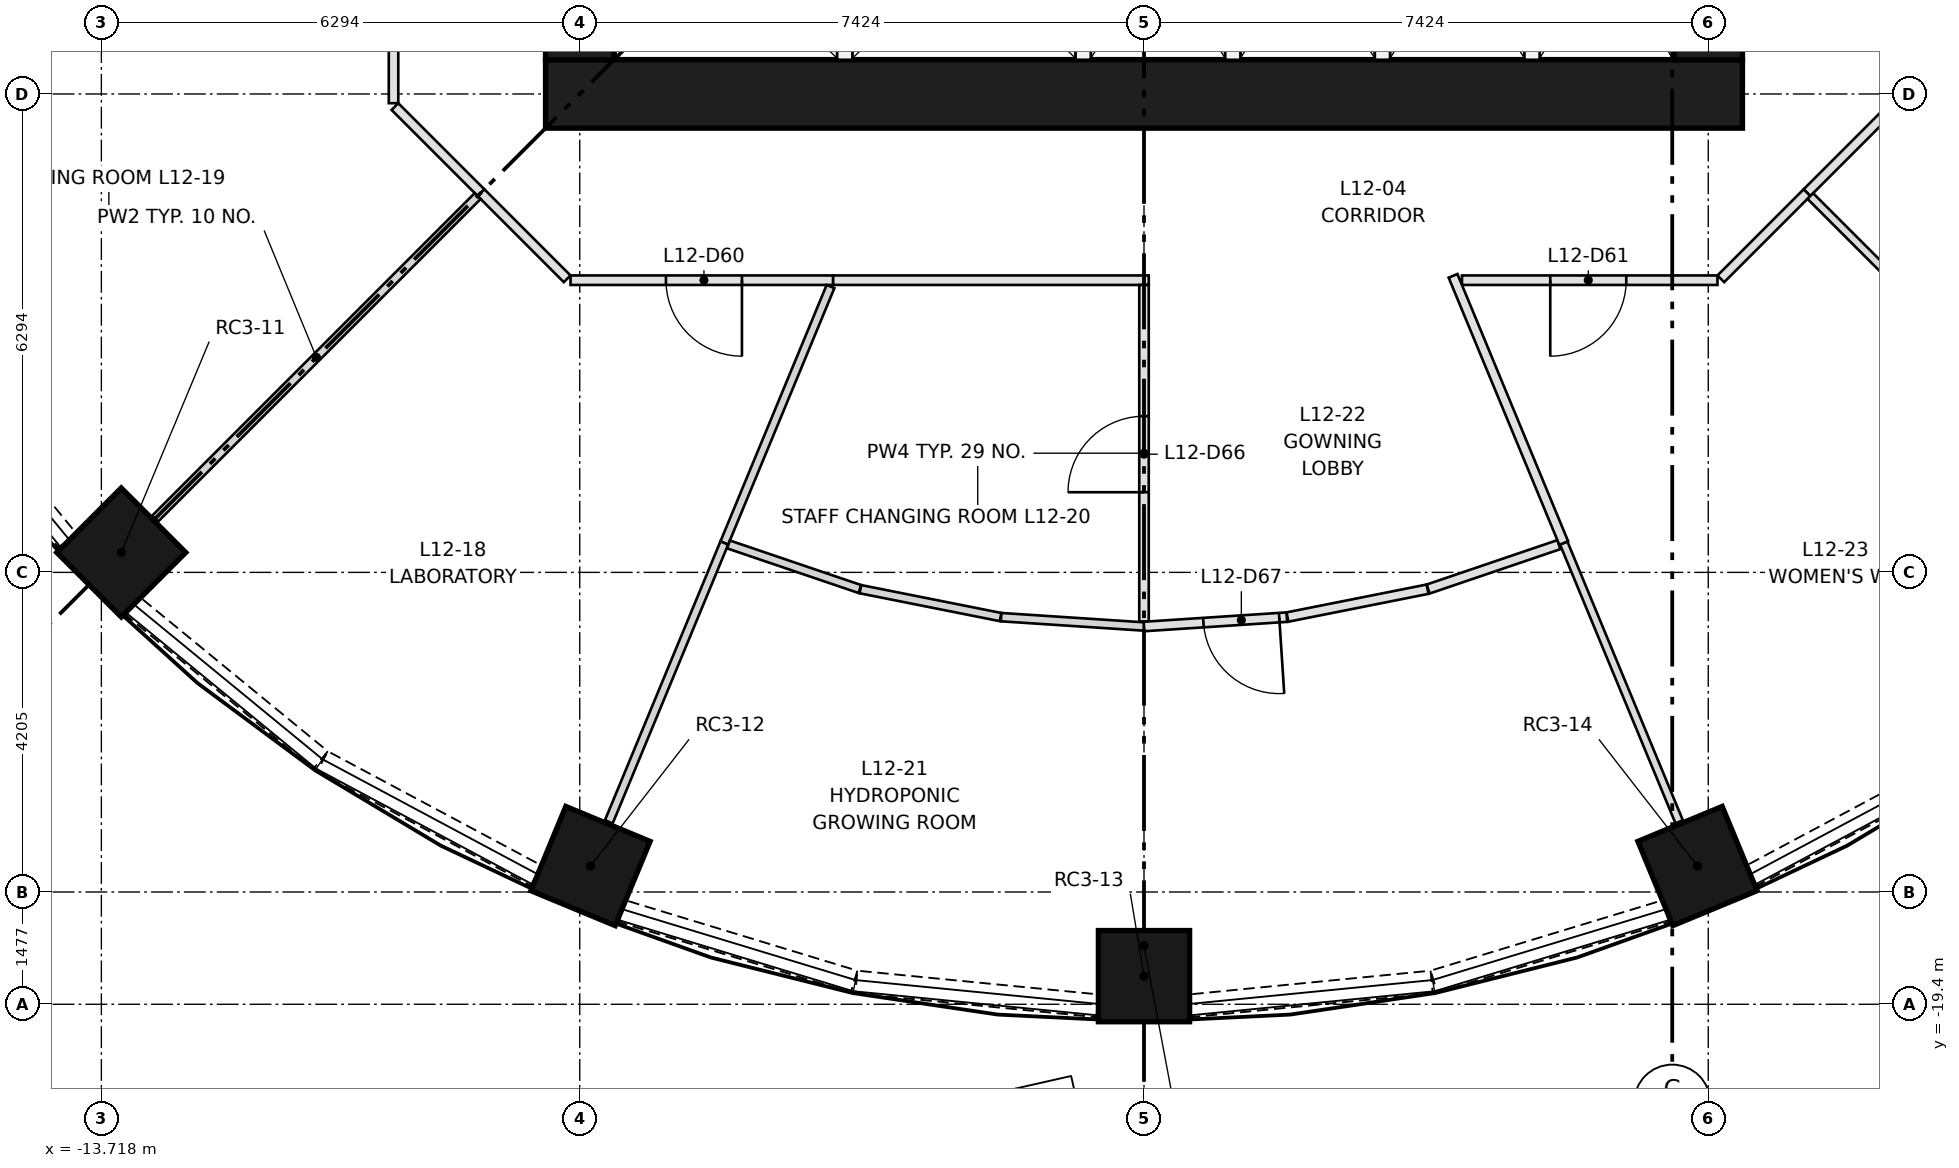
"""IFC4 building model, lengths in metres.
Left out: names, types, materials, properties, quantities, classifications, styles, units other than length and angle.
Written with IfcOpenShell. Run it as: python <this file> out.ifc"""

import sys

from ifc_helpers import new_model, si_unit, direction, frame, frame_2d, origin, origin_2d, place, context, subcontext, project, spatial, rectangle, extrude, element, fill, save


model = new_model("IFC4")
c1 = context("Model", 3, precision=1e-05, world=origin(), true_north=direction((0.0, 1.0)))
c2 = subcontext(c1, "Body", "Model", "MODEL_VIEW")
j1 = project(units=[si_unit("LENGTHUNIT", "METRE"), si_unit("PLANEANGLEUNIT", "RADIAN")], contexts=[c1])
p1 = place(None, origin())
s1 = spatial("IfcSite", under=j1, at=p1, CompositionType="ELEMENT")
p2 = place(p1, origin())
s2 = spatial("IfcBuilding", under=s1, at=p2, CompositionType="ELEMENT")
p3 = place(p2, frame((0.0, 0.0, 48.1)))
s3 = spatial("IfcBuildingStorey", under=s2, at=p3, CompositionType="ELEMENT", Elevation=48.1)
for number, where, z_axis, x_axis in (
    (1, (-13.456, -13.456, 0.0), (0.0, 0.0, 1.0), (-0.707, -0.707, 0.0)),
    (2, (-7.282, -17.582, 0.0), (0.0, 0.0, 1.0), (-0.383, -0.924, 0.0)),
    (3, (0.0, -19.03, 0.0), (0.0, 0.0, 1.0), (0.0, -1.0, 0.0)),
    (4, (7.282, -17.582, 0.0), (0.0, 0.0, 1.0), (0.383, -0.924, 0.0)),
):
    element("IfcColumn", number, at=place(p3, frame(where, z_axis=z_axis, x_axis=x_axis)), inside=s3, PredefinedType="COLUMN", context=c2, shape_type="SweptSolid", body=[
        extrude(rectangle(XDim=1.2, YDim=1.2, at=origin_2d()), origin(), (0.0, 0.0, 1.0), 3.65),
    ])
p4 = place(p3, frame((-7.874, -7.424, 0.0), z_axis=(0.0, 0.0, 1.0), x_axis=(1.0, 0.0, 0.0)))
e5 = element("IfcWall", 5, at=p4, inside=s3, PredefinedType="SHEAR", context=c2, shape_type="SweptSolid", body=[
    extrude(rectangle(XDim=15.748, YDim=0.9, at=frame_2d((7.874, 0.0))), origin(), (0.0, 0.0, 1.0), 3.65),
])
p5 = place(p3, frame((-7.424, -6.974, 0.0), z_axis=(0.0, 0.0, 1.0), x_axis=(0.0, 1.0, 0.0)))
e6 = element("IfcWall", 6, at=p5, inside=s3, PredefinedType="SHEAR", context=c2, shape_type="SweptSolid", body=[
    extrude(rectangle(XDim=13.948, YDim=0.9, at=frame_2d((6.974, 0.0))), origin(), (0.0, 0.0, 1.0), 3.65),
])
p6 = place(p5, frame((6.474, 0.0, 0.0)))
e7 = element("IfcOpeningElement", 7, at=p6, cuts=e6, PredefinedType="OPENING", context=c2, shape_type="SweptSolid", body=[
    extrude(rectangle(XDim=1.0, YDim=2.1, at=frame_2d((0.5, 1.05))), frame((0.0, 0.46, 0.0), z_axis=(0.0, -1.0, 0.0), x_axis=(1.0, 0.0, 0.0)), (0.0, 0.0, 1.0), 0.92),
])
p7 = place(p5, frame((3.35, 0.0, 0.0)))
e8 = element("IfcOpeningElement", 8, at=p7, cuts=e6, PredefinedType="OPENING", context=c2, shape_type="SweptSolid", body=[
    extrude(rectangle(XDim=1.8, YDim=2.1, at=frame_2d((0.9, 1.05))), frame((0.0, 0.46, 0.0), z_axis=(0.0, -1.0, 0.0), x_axis=(1.0, 0.0, 0.0)), (0.0, 0.0, 1.0), 0.92),
])
p8 = place(p5, frame((8.799, 0.0, 0.0)))
e9 = element("IfcOpeningElement", 9, at=p8, cuts=e6, PredefinedType="OPENING", context=c2, shape_type="SweptSolid", body=[
    extrude(rectangle(XDim=1.8, YDim=2.1, at=frame_2d((0.9, 1.05))), frame((0.0, 0.46, 0.0), z_axis=(0.0, -1.0, 0.0), x_axis=(1.0, 0.0, 0.0)), (0.0, 0.0, 1.0), 0.92),
])
p9 = place(p5, frame((11.974, 0.0, 0.0)))
e10 = element("IfcOpeningElement", 10, at=p9, cuts=e6, PredefinedType="OPENING", context=c2, shape_type="SweptSolid", body=[
    extrude(rectangle(XDim=1.0, YDim=2.1, at=frame_2d((0.5, 1.05))), frame((0.0, 0.46, 0.0), z_axis=(0.0, -1.0, 0.0), x_axis=(1.0, 0.0, 0.0)), (0.0, 0.0, 1.0), 0.92),
])
p10 = place(p3, frame((7.424, -6.974, 0.0), z_axis=(0.0, 0.0, 1.0), x_axis=(0.0, 1.0, 0.0)))
e11 = element("IfcWall", 11, at=p10, inside=s3, PredefinedType="SHEAR", context=c2, shape_type="SweptSolid", body=[
    extrude(rectangle(XDim=13.948, YDim=0.9, at=frame_2d((6.974, 0.0))), origin(), (0.0, 0.0, 1.0), 3.65),
])
p11 = place(p10, frame((6.474, 0.0, 0.0)))
e12 = element("IfcOpeningElement", 12, at=p11, cuts=e11, PredefinedType="OPENING", context=c2, shape_type="SweptSolid", body=[
    extrude(rectangle(XDim=1.0, YDim=2.1, at=frame_2d((0.5, 1.05))), frame((0.0, 0.46, 0.0), z_axis=(0.0, -1.0, 0.0), x_axis=(1.0, 0.0, 0.0)), (0.0, 0.0, 1.0), 0.92),
])
p12 = place(p10, frame((3.35, 0.0, 0.0)))
e13 = element("IfcOpeningElement", 13, at=p12, cuts=e11, PredefinedType="OPENING", context=c2, shape_type="SweptSolid", body=[
    extrude(rectangle(XDim=1.8, YDim=2.1, at=frame_2d((0.9, 1.05))), frame((0.0, 0.46, 0.0), z_axis=(0.0, -1.0, 0.0), x_axis=(1.0, 0.0, 0.0)), (0.0, 0.0, 1.0), 0.92),
])
p13 = place(p10, frame((8.799, 0.0, 0.0)))
e14 = element("IfcOpeningElement", 14, at=p13, cuts=e11, PredefinedType="OPENING", context=c2, shape_type="SweptSolid", body=[
    extrude(rectangle(XDim=1.8, YDim=2.1, at=frame_2d((0.9, 1.05))), frame((0.0, 0.46, 0.0), z_axis=(0.0, -1.0, 0.0), x_axis=(1.0, 0.0, 0.0)), (0.0, 0.0, 1.0), 0.92),
])
for number, where, z_axis, x_axis in (
    (15, (-3.937, -6.974, 0.0), (0.0, 0.0, 1.0), (0.0, 1.0, 0.0)),
    (16, (-0.8, -6.974, 0.0), (0.0, 0.0, 1.0), (0.0, 1.0, 0.0)),
    (17, (1.168, -6.974, 0.0), (0.0, 0.0, 1.0), (0.0, 1.0, 0.0)),
    (18, (3.137, -6.974, 0.0), (0.0, 0.0, 1.0), (0.0, 1.0, 0.0)),
    (19, (5.105, -6.974, 0.0), (0.0, 0.0, 1.0), (0.0, 1.0, 0.0)),
):
    element("IfcWall", number, at=place(p3, frame(where, z_axis=z_axis, x_axis=x_axis)), inside=s3, PredefinedType="PARTITIONING", context=c2, shape_type="SweptSolid", body=[
        extrude(rectangle(XDim=2.8, YDim=0.2, at=frame_2d((1.4, 0.0))), origin(), (0.0, 0.0, 1.0), 3.3),
    ])
for number, where, z_axis, x_axis in (
    (20, (-16.188, -10.833, 0.0), (0.0, 0.0, 1.0), (0.634, -0.773, 0.0)),
    (21, (-13.298, -14.166, 0.0), (0.0, 0.0, 1.0), (0.773, -0.634, 0.0)),
):
    element("IfcWall", number, at=place(p3, frame(where, z_axis=z_axis, x_axis=x_axis)), inside=s3, PredefinedType="SOLIDWALL", context=c2, shape_type="SweptSolid", body=[
        extrude(rectangle(XDim=3.188, YDim=0.3, at=frame_2d((1.594, 0.0))), origin(), (0.0, 0.0, 1.0), 0.9),
    ])
p14 = place(p3, frame((-10.809, -16.204, 0.0), z_axis=(0.0, 0.0, 1.0), x_axis=(0.881994263934, -0.471260138764, 0.0)))
e22 = element("IfcWall", 22, at=p14, inside=s3, PredefinedType="SOLIDWALL", context=c2, shape_type="SweptSolid", body=[
    extrude(rectangle(XDim=3.187, YDim=0.3, at=frame_2d((1.593, 0.0))), origin(), (0.0, 0.0, 1.0), 0.9),
])
p15 = place(p3, frame((-6.865, -18.175, 0.0), z_axis=(0.0, 0.0, 1.0), x_axis=(0.956849017819, -0.290585541792, 0.0)))
e23 = element("IfcWall", 23, at=p15, inside=s3, PredefinedType="SOLIDWALL", context=c2, shape_type="SweptSolid", body=[
    extrude(rectangle(XDim=3.188, YDim=0.3, at=frame_2d((1.594, 0.0))), origin(), (0.0, 0.0, 1.0), 0.9),
])
for number, where, z_axis, x_axis in (
    (24, (-3.785, -19.107, 0.0), (0.0, 0.0, 1.0), (0.995, -0.098, 0.0)),
    (25, (0.613, -19.419, 0.0), (0.0, 0.0, 1.0), (0.995, 0.098, 0.0)),
):
    element("IfcWall", number, at=place(p3, frame(where, z_axis=z_axis, x_axis=x_axis)), inside=s3, PredefinedType="SOLIDWALL", context=c2, shape_type="SweptSolid", body=[
        extrude(rectangle(XDim=3.188, YDim=0.3, at=frame_2d((1.594, 0.0))), origin(), (0.0, 0.0, 1.0), 0.9),
    ])
p16 = place(p3, frame((3.814, -19.102, 0.0), z_axis=(0.0, 0.0, 1.0), x_axis=(0.956849017819, 0.290585541792, 0.0)))
e26 = element("IfcWall", 26, at=p16, inside=s3, PredefinedType="SOLIDWALL", context=c2, shape_type="SweptSolid", body=[
    extrude(rectangle(XDim=3.188, YDim=0.3, at=frame_2d((1.594, 0.0))), origin(), (0.0, 0.0, 1.0), 0.9),
])
p17 = place(p3, frame((7.998, -17.706, 0.0), z_axis=(0.0, 0.0, 1.0), x_axis=(0.881994263934, 0.471260138764, 0.0)))
e27 = element("IfcWall", 27, at=p17, inside=s3, PredefinedType="SOLIDWALL", context=c2, shape_type="SweptSolid", body=[
    extrude(rectangle(XDim=3.187, YDim=0.3, at=frame_2d((1.593, 0.0))), origin(), (0.0, 0.0, 1.0), 0.9),
])
p18 = place(p3, frame((9.856, -7.589, 0.0), z_axis=(0.0, 0.0, 1.0), x_axis=(-0.70718294931, -0.707030604857, 0.0)))
e28 = element("IfcWall", 28, at=p18, inside=s3, PredefinedType="PARTITIONING", context=c2, shape_type="SweptSolid", body=[
    extrude(rectangle(XDim=1.603, YDim=0.125, at=frame_2d((0.801, 0.0))), origin(), (0.0, 0.0, 1.0), 3.3),
])
p19 = place(p3, frame((-9.874, -7.545, 0.0), z_axis=(0.0, 0.0, 1.0), x_axis=(0.0, 1.0, 0.0)))
e29 = element("IfcWall", 29, at=p19, inside=s3, PredefinedType="PARTITIONING", context=c2, shape_type="SweptSolid", body=[
    extrude(rectangle(XDim=3.455, YDim=0.125, at=frame_2d((1.728, 0.0))), origin(), (0.0, 0.0, 1.0), 3.3),
])
p20 = place(p19, frame((1.2, 0.0, 0.0)))
e30 = element("IfcOpeningElement", 30, at=p20, cuts=e29, PredefinedType="OPENING", context=c2, shape_type="SweptSolid", body=[
    extrude(rectangle(XDim=1.0, YDim=2.1, at=frame_2d((0.5, 1.05))), frame((0.0, 0.073, 0.0), z_axis=(0.0, -1.0, 0.0), x_axis=(1.0, 0.0, 0.0)), (0.0, 0.0, 1.0), 0.145),
])
for number, where, z_axis, x_axis in (
    (31, (-8.722, -8.722, 0.0), (0.0, 0.0, 1.0), (-0.707, 0.707, 0.0)),
    (32, (-7.589, -9.856, 0.0), (0.0, 0.0, 1.0), (-0.707, 0.707, 0.0)),
):
    element("IfcWall", number, at=place(p3, frame(where, z_axis=z_axis, x_axis=x_axis)), inside=s3, PredefinedType="PARTITIONING", context=c2, shape_type="SweptSolid", body=[
        extrude(rectangle(XDim=1.603, YDim=0.125, at=frame_2d((0.801, 0.0))), origin(), (0.0, 0.0, 1.0), 3.3),
    ])
p21 = place(p3, frame((-4.09, -9.874, 0.0), z_axis=(0.0, 0.0, 1.0), x_axis=(-1.0, 0.0, 0.0)))
e33 = element("IfcWall", 33, at=p21, inside=s3, PredefinedType="PARTITIONING", context=c2, shape_type="SweptSolid", body=[
    extrude(rectangle(XDim=3.455, YDim=0.125, at=frame_2d((1.728, 0.0))), origin(), (0.0, 0.0, 1.0), 3.3),
])
p22 = place(p21, frame((1.2, 0.0, 0.0)))
e34 = element("IfcOpeningElement", 34, at=p22, cuts=e33, PredefinedType="OPENING", context=c2, shape_type="SweptSolid", body=[
    extrude(rectangle(XDim=1.0, YDim=2.1, at=frame_2d((0.5, 1.05))), frame((0.0, 0.073, 0.0), z_axis=(0.0, -1.0, 0.0), x_axis=(1.0, 0.0, 0.0)), (0.0, 0.0, 1.0), 0.145),
])
p23 = place(p3, frame((0.062, -9.874, 0.0), z_axis=(0.0, 0.0, 1.0), x_axis=(-1.0, 0.0, 0.0)))
e35 = element("IfcWall", 35, at=p23, inside=s3, PredefinedType="PARTITIONING", context=c2, shape_type="SweptSolid", body=[
    extrude(rectangle(XDim=4.152, YDim=0.125, at=frame_2d((2.076, 0.0))), origin(), (0.0, 0.0, 1.0), 3.3),
])
p24 = place(p3, frame((7.545, -9.874, 0.0), z_axis=(0.0, 0.0, 1.0), x_axis=(-1.0, 0.0, 0.0)))
e36 = element("IfcWall", 36, at=p24, inside=s3, PredefinedType="PARTITIONING", context=c2, shape_type="SweptSolid", body=[
    extrude(rectangle(XDim=3.362, YDim=0.125, at=frame_2d((1.681, 0.0))), origin(), (0.0, 0.0, 1.0), 3.3),
])
p25 = place(p24, frame((1.2, 0.0, 0.0)))
e37 = element("IfcOpeningElement", 37, at=p25, cuts=e36, PredefinedType="OPENING", context=c2, shape_type="SweptSolid", body=[
    extrude(rectangle(XDim=1.0, YDim=2.1, at=frame_2d((0.5, 1.05))), frame((0.0, 0.073, 0.0), z_axis=(0.0, -1.0, 0.0), x_axis=(1.0, 0.0, 0.0)), (0.0, 0.0, 1.0), 0.145),
])
p26 = place(p3, frame((8.722, -8.722, 0.0), z_axis=(0.0, 0.0, 1.0), x_axis=(-0.707030604857, -0.70718294931, 0.0)))
e38 = element("IfcWall", 38, at=p26, inside=s3, PredefinedType="PARTITIONING", context=c2, shape_type="SweptSolid", body=[
    extrude(rectangle(XDim=1.603, YDim=0.125, at=frame_2d((0.801, 0.0))), origin(), (0.0, 0.0, 1.0), 3.3),
])
p27 = place(p3, frame((-13.147, -5.446, 0.0), z_axis=(0.0, 0.0, 1.0), x_axis=(-0.923873410436, -0.382698212028, 0.0)))
e39 = element("IfcWall", 39, at=p27, inside=s3, PredefinedType="PARTITIONING", context=c2, shape_type="SweptSolid", body=[
    extrude(rectangle(XDim=4.17, YDim=0.11, at=frame_2d((2.085, 0.0))), origin(), (0.0, 0.0, 1.0), 3.3),
])
p28 = place(p3, frame((-13.011, -13.011, 0.0), z_axis=(0.0, 0.0, 1.0), x_axis=(0.707106781187, 0.707106781187, 0.0)))
e40 = element("IfcWall", 40, at=p28, inside=s3, PredefinedType="PARTITIONING", context=c2, shape_type="SweptSolid", body=[
    extrude(rectangle(XDim=6.002, YDim=0.11, at=frame_2d((3.001, 0.0))), origin(), (0.0, 0.0, 1.0), 3.3),
])
p29 = place(p3, frame((-4.125, -9.958, 0.0), z_axis=(0.0, 0.0, 1.0), x_axis=(-0.382715874613, -0.923866093825, 0.0)))
e41 = element("IfcWall", 41, at=p29, inside=s3, PredefinedType="PARTITIONING", context=c2, shape_type="SweptSolid", body=[
    extrude(rectangle(XDim=3.652, YDim=0.11, at=frame_2d((1.826, 0.0))), origin(), (0.0, 0.0, 1.0), 3.3),
])
p30 = place(p3, frame((-5.522, -13.332, 0.0), z_axis=(0.0, 0.0, 1.0), x_axis=(-0.382675844596, -0.923882675432, 0.0)))
e42 = element("IfcWall", 42, at=p30, inside=s3, PredefinedType="PARTITIONING", context=c2, shape_type="SweptSolid", body=[
    extrude(rectangle(XDim=3.97, YDim=0.11, at=frame_2d((1.985, 0.0))), origin(), (0.0, 0.0, 1.0), 3.3),
])
p31 = place(p3, frame((-3.738, -13.937, 0.0), z_axis=(0.0, 0.0, 1.0), x_axis=(-0.94697070508, 0.321319908688, 0.0)))
e43 = element("IfcWall", 43, at=p31, inside=s3, PredefinedType="PARTITIONING", context=c2, shape_type="SweptSolid", body=[
    extrude(rectangle(XDim=1.825, YDim=0.11, at=frame_2d((0.913, 0.0))), origin(), (0.0, 0.0, 1.0), 3.3),
])
p32 = place(p3, frame((-1.887, -14.306, 0.0), z_axis=(0.0, 0.0, 1.0), x_axis=(-0.980774944963, 0.195142274593, 0.0)))
e44 = element("IfcWall", 44, at=p32, inside=s3, PredefinedType="PARTITIONING", context=c2, shape_type="SweptSolid", body=[
    extrude(rectangle(XDim=1.88, YDim=0.11, at=frame_2d((0.94, 0.0))), origin(), (0.0, 0.0, 1.0), 3.3),
])
p33 = place(p3, frame((0.0, -14.43, 0.0), z_axis=(0.0, 0.0, 1.0), x_axis=(-0.997856255434, 0.06544381935, 0.0)))
e45 = element("IfcWall", 45, at=p33, inside=s3, PredefinedType="PARTITIONING", context=c2, shape_type="SweptSolid", body=[
    extrude(rectangle(XDim=1.884, YDim=0.11, at=frame_2d((0.942, 0.0))), origin(), (0.0, 0.0, 1.0), 3.3),
])
p34 = place(p3, frame((0.0, -14.363, 0.0), z_axis=(0.0, 0.0, 1.0), x_axis=(0.0, 1.0, 0.0)))
e46 = element("IfcWall", 46, at=p34, inside=s3, PredefinedType="PARTITIONING", context=c2, shape_type="SweptSolid", body=[
    extrude(rectangle(XDim=4.427, YDim=0.125, at=frame_2d((2.213, 0.0))), origin(), (0.0, 0.0, 1.0), 3.3),
])
p35 = place(p34, frame((1.7, 0.0, 0.0)))
e47 = element("IfcOpeningElement", 47, at=p35, cuts=e46, PredefinedType="OPENING", context=c2, shape_type="SweptSolid", body=[
    extrude(rectangle(XDim=1.0, YDim=2.1, at=frame_2d((0.5, 1.05))), frame((0.0, 0.073, 0.0), z_axis=(0.0, -1.0, 0.0), x_axis=(1.0, 0.0, 0.0)), (0.0, 0.0, 1.0), 0.145),
])
p36 = place(p3, frame((1.879, -14.307, 0.0), z_axis=(0.0, 0.0, 1.0), x_axis=(-0.997863603838, -0.065331677882, 0.0)))
e48 = element("IfcWall", 48, at=p36, inside=s3, PredefinedType="PARTITIONING", context=c2, shape_type="SweptSolid", body=[
    extrude(rectangle(XDim=1.883, YDim=0.125, at=frame_2d((0.942, 0.0))), origin(), (0.0, 0.0, 1.0), 3.3),
])
p37 = place(p36, frame((0.1, 0.0, 0.0)))
e49 = element("IfcOpeningElement", 49, at=p37, cuts=e48, PredefinedType="OPENING", context=c2, shape_type="SweptSolid", body=[
    extrude(rectangle(XDim=1.0, YDim=2.1, at=frame_2d((0.5, 1.05))), frame((0.0, 0.073, 0.0), z_axis=(0.0, -1.0, 0.0), x_axis=(1.0, 0.0, 0.0)), (0.0, 0.0, 1.0), 0.145),
])
p38 = place(p3, frame((1.887, -14.306, 0.0), z_axis=(0.0, 0.0, 1.0), x_axis=(0.980804871908, 0.194991803011, 0.0)))
e50 = element("IfcWall", 50, at=p38, inside=s3, PredefinedType="PARTITIONING", context=c2, shape_type="SweptSolid", body=[
    extrude(rectangle(XDim=1.879, YDim=0.125, at=frame_2d((0.94, 0.0))), origin(), (0.0, 0.0, 1.0), 3.3),
])
p39 = place(p3, frame((3.739, -13.937, 0.0), z_axis=(0.0, 0.0, 1.0), x_axis=(0.946921731465, 0.32146420404, 0.0)))
e51 = element("IfcWall", 51, at=p39, inside=s3, PredefinedType="PARTITIONING", context=c2, shape_type="SweptSolid", body=[
    extrude(rectangle(XDim=1.817, YDim=0.125, at=frame_2d((0.908, 0.0))), origin(), (0.0, 0.0, 1.0), 3.3),
])
p40 = place(p3, frame((5.522, -13.332, 0.0), z_axis=(0.0, 0.0, 1.0), x_axis=(0.382675844596, -0.923882675432, 0.0)))
e52 = element("IfcWall", 52, at=p40, inside=s3, PredefinedType="PARTITIONING", context=c2, shape_type="SweptSolid", body=[
    extrude(rectangle(XDim=3.97, YDim=0.105, at=frame_2d((1.985, 0.0))), origin(), (0.0, 0.0, 1.0), 3.3),
])
p41 = place(p3, frame((4.066, -9.816, 0.0), z_axis=(0.0, 0.0, 1.0), x_axis=(0.382746586719, -0.923853370592, 0.0)))
e53 = element("IfcWall", 53, at=p41, inside=s3, PredefinedType="PARTITIONING", context=c2, shape_type="SweptSolid", body=[
    extrude(rectangle(XDim=3.805, YDim=0.125, at=frame_2d((1.902, 0.0))), origin(), (0.0, 0.0, 1.0), 3.3),
])
p42 = place(p3, frame((8.767, -8.767, 0.0), z_axis=(0.0, 0.0, 1.0), x_axis=(0.707106781187, -0.707106781187, 0.0)))
e54 = element("IfcWall", 54, at=p42, inside=s3, PredefinedType="PARTITIONING", context=c2, shape_type="SweptSolid", body=[
    extrude(rectangle(XDim=6.002, YDim=0.105, at=frame_2d((3.001, 0.0))), origin(), (0.0, 0.0, 1.0), 3.3),
])
p43 = place(p22, origin())
e55 = element("IfcDoor", 55, at=p43, inside=s3, OperationType="SINGLE_SWING_LEFT", PredefinedType="DOOR", context=c2, shape_type="SweptSolid", body=[
    extrude(rectangle(XDim=1.0, YDim=2.1, at=frame_2d((0.5, 1.05))), frame((0.0, 0.025, 0.0), z_axis=(0.0, -1.0, 0.0), x_axis=(1.0, 0.0, 0.0)), (0.0, 0.0, 1.0), 0.05),
])
fill(e34, e55)
p44 = place(p25, origin())
e56 = element("IfcDoor", 56, at=p44, inside=s3, OperationType="SINGLE_SWING_RIGHT", PredefinedType="DOOR", context=c2, shape_type="SweptSolid", body=[
    extrude(rectangle(XDim=1.0, YDim=2.1, at=frame_2d((0.5, 1.05))), frame((0.0, 0.025, 0.0), z_axis=(0.0, -1.0, 0.0), x_axis=(1.0, 0.0, 0.0)), (0.0, 0.0, 1.0), 0.05),
])
fill(e37, e56)
p45 = place(p35, origin())
e57 = element("IfcDoor", 57, at=p45, inside=s3, OperationType="SINGLE_SWING_LEFT", PredefinedType="DOOR", context=c2, shape_type="SweptSolid", body=[
    extrude(rectangle(XDim=1.0, YDim=2.1, at=frame_2d((0.5, 1.05))), frame((0.0, 0.025, 0.0), z_axis=(0.0, -1.0, 0.0), x_axis=(1.0, 0.0, 0.0)), (0.0, 0.0, 1.0), 0.05),
])
fill(e47, e57)
p46 = place(p37, origin())
e58 = element("IfcDoor", 58, at=p46, inside=s3, OperationType="SINGLE_SWING_LEFT", PredefinedType="DOOR", context=c2, shape_type="SweptSolid", body=[
    extrude(rectangle(XDim=1.0, YDim=2.1, at=frame_2d((0.5, 1.05))), frame((0.0, 0.025, 0.0), z_axis=(0.0, -1.0, 0.0), x_axis=(1.0, 0.0, 0.0)), (0.0, 0.0, 1.0), 0.05),
])
fill(e49, e58)
save(model, sys.argv[1])
